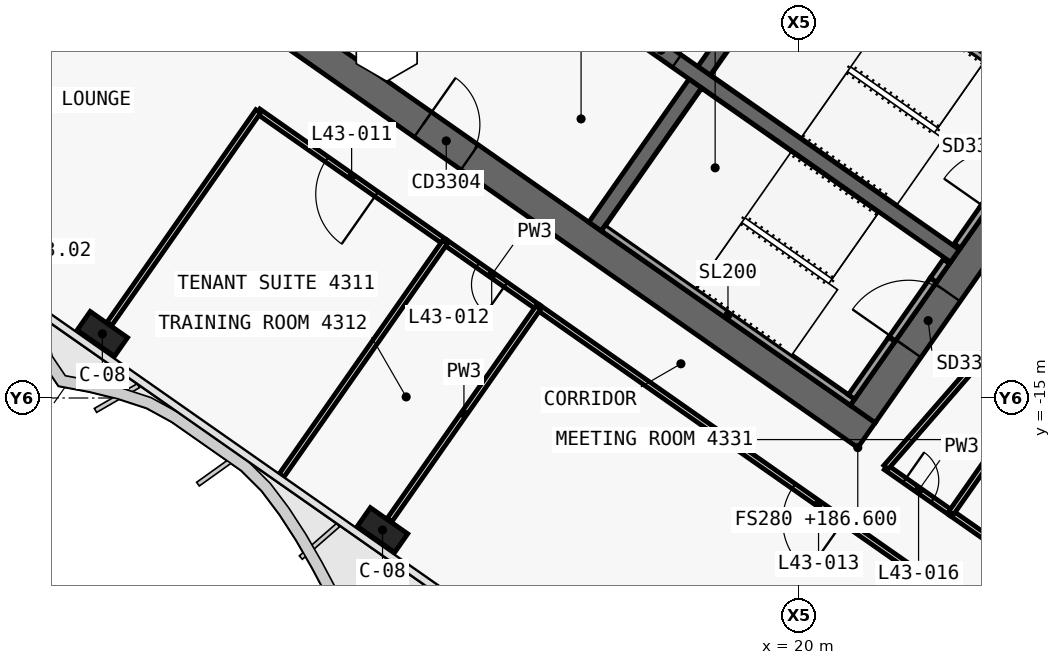
"""IFC4 building model, lengths in metres.
Left out: names, types, materials, properties, quantities, classifications, styles, units other than length and angle.
Written with IfcOpenShell. Run it as: python <this file> out.ifc"""

import sys

from ifc_helpers import new_model, si_unit, direction, frame, frame_2d, origin, origin_2d, place, context, subcontext, project, spatial, polyline, rectangle, outline, extrude, element, fill, save


model = new_model("IFC4")
c1 = context("Model", 3, precision=1e-05, world=origin(), true_north=direction((0.0, 1.0)))
c2 = subcontext(c1, "Body", "Model", "MODEL_VIEW")
j1 = project(units=[si_unit("LENGTHUNIT", "METRE"), si_unit("PLANEANGLEUNIT", "RADIAN")], contexts=[c1])
p1 = place(None, origin())
s1 = spatial("IfcSite", under=j1, at=p1, CompositionType="ELEMENT")
p2 = place(p1, origin())
s2 = spatial("IfcBuilding", under=s1, at=p2, CompositionType="ELEMENT")
p3 = place(p2, frame((0.0, 0.0, 186.6)))
s3 = spatial("IfcBuildingStorey", under=s2, at=p3, CompositionType="ELEMENT", Elevation=186.6)
p4 = place(p3, frame((-0.029, 11.984, 0.0), z_axis=(0.0, 0.0, 1.0), x_axis=(0.819151382952, -0.573577380837, 0.0)))
e1 = element("IfcWall", 1, at=p4, inside=s3, PredefinedType="SHEAR", context=c2, shape_type="SweptSolid", body=[
    extrude(outline(polyline([(33.898, 0.4), (-0.0, 0.4), (0.56, -0.4), (33.898, -0.4), (33.898, 0.4)])), origin(), (0.0, 0.0, 1.0), 3.9),
])
p5 = place(p3, frame((-0.029, -0.712, 0.0), z_axis=(0.0, 0.0, 1.0), x_axis=(0.819151758019, -0.573576845187, 0.0)))
e2 = element("IfcWall", 2, at=p5, inside=s3, PredefinedType="SHEAR", context=c2, shape_type="SweptSolid", body=[
    extrude(outline(polyline([(26.616, 0.4), (-0.0, 0.4), (0.56, -0.4), (26.616, -0.4), (26.616, 0.4)])), origin(), (0.0, 0.0, 1.0), 3.9),
])
p6 = place(p5, frame((1.166, 0.0, 0.0)))
e3 = element("IfcOpeningElement", 3, at=p6, cuts=e2, PredefinedType="OPENING", context=c2, shape_type="SweptSolid", body=[
    extrude(rectangle(XDim=1.5, YDim=2.1, at=frame_2d((0.75, 1.05))), frame((0.0, 0.41, 0.0), z_axis=(0.0, -1.0, 0.0), x_axis=(1.0, 0.0, 0.0)), (0.0, 0.0, 1.0), 0.82),
])
p7 = place(p5, frame((12.366, 0.0, 0.0)))
e4 = element("IfcOpeningElement", 4, at=p7, cuts=e2, PredefinedType="OPENING", context=c2, shape_type="SweptSolid", body=[
    extrude(rectangle(XDim=1.5, YDim=2.1, at=frame_2d((0.75, 1.05))), frame((0.0, 0.41, 0.0), z_axis=(0.0, -1.0, 0.0), x_axis=(1.0, 0.0, 0.0)), (0.0, 0.0, 1.0), 0.82),
])
p8 = place(p3, frame((21.675, -15.421, 0.0), z_axis=(0.0, 0.0, 1.0), x_axis=(0.573581815061, 0.819148278049, 0.0)))
e5 = element("IfcWall", 5, at=p8, inside=s3, PredefinedType="SHEAR", context=c2, shape_type="SweptSolid", body=[
    extrude(outline(polyline([(9.6, 0.4), (0.0, 0.4), (0.0, -0.4), (9.6, -0.4), (9.6, 0.4)])), origin(), (0.0, 0.0, 1.0), 3.9),
])
p9 = place(p8, frame((6.3, 0.0, 0.0)))
e6 = element("IfcOpeningElement", 6, at=p9, cuts=e5, PredefinedType="OPENING", context=c2, shape_type="SweptSolid", body=[
    extrude(rectangle(XDim=1.8, YDim=2.1, at=frame_2d((0.9, 1.05))), frame((0.0, 0.41, 0.0), z_axis=(0.0, -1.0, 0.0), x_axis=(1.0, 0.0, 0.0)), (0.0, 0.0, 1.0), 0.82),
])
p10 = place(p8, frame((2.1, 0.0, 0.0)))
e7 = element("IfcOpeningElement", 7, at=p10, cuts=e5, PredefinedType="OPENING", context=c2, shape_type="SweptSolid", body=[
    extrude(rectangle(XDim=1.8, YDim=2.1, at=frame_2d((0.9, 1.05))), frame((0.0, 0.41, 0.0), z_axis=(0.0, -1.0, 0.0), x_axis=(1.0, 0.0, 0.0)), (0.0, 0.0, 1.0), 0.82),
])
p11 = place(p3, frame((14.63, -10.488, 0.0), z_axis=(0.0, 0.0, 1.0), x_axis=(0.573611936273, 0.819127185829, 0.0)))
e8 = element("IfcWall", 8, at=p11, inside=s3, PredefinedType="SHEAR", context=c2, shape_type="SweptSolid", body=[
    extrude(outline(polyline([(0.0, 0.2), (0.0, -0.2), (4.6, -0.2), (4.6, 0.2), (0.0, 0.2)])), origin(), (0.0, 0.0, 1.0), 3.9),
])
p12 = place(p3, frame((17.498, -6.392, 0.0), z_axis=(0.0, 0.0, 1.0), x_axis=(0.573611936273, 0.819127185829, 0.0)))
e9 = element("IfcWall", 9, at=p12, inside=s3, PredefinedType="SHEAR", context=c2, shape_type="SweptSolid", body=[
    extrude(outline(polyline([(4.6, -0.2), (4.6, 0.2), (0.0, 0.2), (0.0, -0.2), (4.6, -0.2)])), origin(), (0.0, 0.0, 1.0), 3.9),
])
p13 = place(p3, frame((2.638, 3.768, 0.0), z_axis=(0.0, 0.0, 1.0), x_axis=(0.81915267502, -0.573575535572, 0.0)))
e10 = element("IfcWall", 10, at=p13, inside=s3, PredefinedType="SHEAR", context=c2, shape_type="SweptSolid", body=[
    extrude(outline(polyline([(0.0, 0.2), (0.0, -0.2), (26.2, -0.2), (26.2, 0.2), (0.0, 0.2)])), origin(), (0.0, 0.0, 1.0), 3.9),
])
p14 = place(p13, frame((9.637, 0.0, 0.0)))
e11 = element("IfcOpeningElement", 11, at=p14, cuts=e10, PredefinedType="OPENING", context=c2, shape_type="SweptSolid", body=[
    extrude(rectangle(XDim=1.2, YDim=2.1, at=frame_2d((0.6, 1.05))), frame((0.0, 0.21, 0.0), z_axis=(0.0, -1.0, 0.0), x_axis=(1.0, 0.0, 0.0)), (0.0, 0.0, 1.0), 0.42),
])
p15 = place(p13, frame((11.812, 0.0, 0.0)))
e12 = element("IfcOpeningElement", 12, at=p15, cuts=e10, PredefinedType="OPENING", context=c2, shape_type="SweptSolid", body=[
    extrude(rectangle(XDim=1.2, YDim=2.1, at=frame_2d((0.6, 1.05))), frame((0.0, 0.21, 0.0), z_axis=(0.0, -1.0, 0.0), x_axis=(1.0, 0.0, 0.0)), (0.0, 0.0, 1.0), 0.42),
])
p16 = place(p13, frame((13.988, 0.0, 0.0)))
e13 = element("IfcOpeningElement", 13, at=p16, cuts=e10, PredefinedType="OPENING", context=c2, shape_type="SweptSolid", body=[
    extrude(rectangle(XDim=1.2, YDim=2.1, at=frame_2d((0.6, 1.05))), frame((0.0, 0.21, 0.0), z_axis=(0.0, -1.0, 0.0), x_axis=(1.0, 0.0, 0.0)), (0.0, 0.0, 1.0), 0.42),
])
p17 = place(p13, frame((16.262, 0.0, 0.0)))
e14 = element("IfcOpeningElement", 14, at=p17, cuts=e10, PredefinedType="OPENING", context=c2, shape_type="SweptSolid", body=[
    extrude(rectangle(XDim=1.0, YDim=2.1, at=frame_2d((0.5, 1.05))), frame((0.0, 0.21, 0.0), z_axis=(0.0, -1.0, 0.0), x_axis=(1.0, 0.0, 0.0)), (0.0, 0.0, 1.0), 0.42),
])
for number, where, z_axis, x_axis in (
    (15, (1.665, -13.313, 0.0), (0.0, 0.0, 1.0), (0.819, -0.574, 0.0)),
    (16, (9.038, -18.475, 0.0), (0.0, 0.0, 1.0), (0.819, -0.574, 0.0)),
):
    element("IfcColumn", number, at=place(p3, frame(where, z_axis=z_axis, x_axis=x_axis)), inside=s3, PredefinedType="COLUMN", context=c2, shape_type="SweptSolid", body=[
        extrude(rectangle(XDim=1.2, YDim=0.6, at=origin_2d()), origin(), (0.0, 0.0, 1.0), 3.9),
    ])
p18 = place(p3, frame((20.243, -2.821, 0.0), z_axis=(0.0, 0.0, 1.0), x_axis=(0.819141584393, -0.57359137434, 0.0)))
e17 = element("IfcWall", 17, at=p18, inside=s3, PredefinedType="SOLIDWALL", context=c2, shape_type="SweptSolid", body=[
    extrude(rectangle(XDim=8.0, YDim=0.2, at=frame_2d((4.0, 0.0))), origin(), (0.0, 0.0, 1.0), 3.62),
])
p19 = place(p3, frame((24.162, -10.998, 0.0), z_axis=(0.0, 0.0, 1.0), x_axis=(0.573612502218, 0.819126789514, 0.0)))
e18 = element("IfcWall", 18, at=p19, inside=s3, PredefinedType="SOLIDWALL", context=c2, shape_type="SweptSolid", body=[
    extrude(rectangle(XDim=1.2, YDim=0.2, at=frame_2d((0.6, 0.0))), origin(), (0.0, 0.0, 1.0), 3.62),
])
p20 = place(p3, frame((24.85, -10.014, 2.15), z_axis=(0.0, 0.0, 1.0), x_axis=(0.573505465124, 0.819201734296, 0.0)))
e19 = element("IfcWall", 19, at=p20, inside=s3, PredefinedType="SOLIDWALL", context=c2, shape_type="SweptSolid", body=[
    extrude(rectangle(XDim=1.9, YDim=0.2, at=frame_2d((0.95, 0.0))), origin(), (0.0, 0.0, 1.0), 1.47),
])
p21 = place(p3, frame((14.851, -10.521, 0.0), z_axis=(0.0, 0.0, 1.0), x_axis=(0.819141584393, -0.57359137434, 0.0)))
e20 = element("IfcWall", 20, at=p21, inside=s3, PredefinedType="SOLIDWALL", context=c2, shape_type="SweptSolid", body=[
    extrude(rectangle(XDim=8.0, YDim=0.2, at=frame_2d((4.0, 0.0))), origin(), (0.0, 0.0, 1.0), 3.62),
])
p22 = place(p3, frame((21.38, -14.97, 0.0), z_axis=(0.0, 0.0, 1.0), x_axis=(0.573559770908, 0.819163713305, 0.0)))
e21 = element("IfcWall", 21, at=p22, inside=s3, PredefinedType="SOLIDWALL", context=c2, shape_type="SweptSolid", body=[
    extrude(rectangle(XDim=1.85, YDim=0.2, at=frame_2d((0.925, 0.0))), origin(), (0.0, 0.0, 1.0), 3.62),
])
p23 = place(p3, frame((23.531, -11.898, 0.0), z_axis=(0.0, 0.0, 1.0), x_axis=(0.573708088123, 0.819059844958, 0.0)))
e22 = element("IfcWall", 22, at=p23, inside=s3, PredefinedType="SOLIDWALL", context=c2, shape_type="SweptSolid", body=[
    extrude(rectangle(XDim=0.6, YDim=0.2, at=frame_2d((0.3, 0.0))), origin(), (0.0, 0.0, 1.0), 3.62),
])
p24 = place(p3, frame((22.441, -13.455, 2.15), z_axis=(0.0, 0.0, 1.0), x_axis=(0.573591692345, 0.819141361715, 0.0)))
e23 = element("IfcWall", 23, at=p24, inside=s3, PredefinedType="SOLIDWALL", context=c2, shape_type="SweptSolid", body=[
    extrude(rectangle(XDim=1.9, YDim=0.2, at=frame_2d((0.95, 0.0))), origin(), (0.0, 0.0, 1.0), 1.47),
])
p25 = place(p3, frame((22.283, -16.824, 0.0), z_axis=(0.0, 0.0, 1.0), x_axis=(0.819182738768, -0.573532597595, 0.0)))
e24 = element("IfcWall", 24, at=p25, inside=s3, PredefinedType="PARTITIONING", context=c2, shape_type="SweptSolid", body=[
    extrude(rectangle(XDim=2.099, YDim=0.15, at=frame_2d((1.05, 0.0))), origin(), (0.0, 0.0, 1.0), 3.62),
])
p26 = place(p25, frame((0.6, 0.0, 0.0)))
e25 = element("IfcOpeningElement", 25, at=p26, cuts=e24, PredefinedType="OPENING", context=c2, shape_type="SweptSolid", body=[
    extrude(rectangle(XDim=0.9, YDim=2.1, at=frame_2d((0.45, 1.05))), frame((0.0, 0.085, 0.0), z_axis=(0.0, -1.0, 0.0), x_axis=(1.0, 0.0, 0.0)), (0.0, 0.0, 1.0), 0.17),
])
p27 = place(p3, frame((23.999, -18.025, 0.0), z_axis=(0.0, 0.0, 1.0), x_axis=(0.819165703328, -0.573556928727, 0.0)))
e26 = element("IfcWall", 26, at=p27, inside=s3, PredefinedType="PARTITIONING", context=c2, shape_type="SweptSolid", body=[
    extrude(rectangle(XDim=4.504, YDim=0.15, at=frame_2d((2.252, 0.0))), origin(), (0.0, 0.0, 1.0), 3.62),
])
p28 = place(p27, frame((1.452, 0.0, 0.0)))
e27 = element("IfcOpeningElement", 27, at=p28, cuts=e26, PredefinedType="OPENING", context=c2, shape_type="SweptSolid", body=[
    extrude(rectangle(XDim=1.6, YDim=2.1, at=frame_2d((0.8, 1.05))), frame((0.0, 0.085, 0.0), z_axis=(0.0, -1.0, 0.0), x_axis=(1.0, 0.0, 0.0)), (0.0, 0.0, 1.0), 0.17),
])
p29 = place(p3, frame((10.683, -10.898, 0.0), z_axis=(0.0, 0.0, 1.0), x_axis=(-0.819147828287, 0.573582457378, 0.0)))
e28 = element("IfcWall", 28, at=p29, inside=s3, PredefinedType="PARTITIONING", context=c2, shape_type="SweptSolid", body=[
    extrude(rectangle(XDim=6.002, YDim=0.15, at=frame_2d((3.001, 0.0))), origin(), (0.0, 0.0, 1.0), 3.0),
])
p30 = place(p29, frame((2.201, 0.0, 0.0)))
e29 = element("IfcOpeningElement", 29, at=p30, cuts=e28, PredefinedType="OPENING", context=c2, shape_type="SweptSolid", body=[
    extrude(rectangle(XDim=1.6, YDim=2.1, at=frame_2d((0.8, 1.05))), frame((0.0, 0.085, 0.0), z_axis=(0.0, -1.0, 0.0), x_axis=(1.0, 0.0, 0.0)), (0.0, 0.0, 1.0), 0.17),
])
p31 = place(p3, frame((13.14, -12.619, 0.0), z_axis=(0.0, 0.0, 1.0), x_axis=(-0.819128818764, 0.573609604409, 0.0)))
e30 = element("IfcWall", 30, at=p31, inside=s3, PredefinedType="PARTITIONING", context=c2, shape_type="SweptSolid", body=[
    extrude(rectangle(XDim=3.004, YDim=0.15, at=frame_2d((1.502, 0.0))), origin(), (0.0, 0.0, 1.0), 3.0),
])
p32 = place(p31, frame((1.052, 0.0, 0.0)))
e31 = element("IfcOpeningElement", 31, at=p32, cuts=e30, PredefinedType="OPENING", context=c2, shape_type="SweptSolid", body=[
    extrude(rectangle(XDim=0.9, YDim=2.1, at=frame_2d((0.45, 1.05))), frame((0.0, 0.085, 0.0), z_axis=(0.0, -1.0, 0.0), x_axis=(1.0, 0.0, 0.0)), (0.0, 0.0, 1.0), 0.17),
])
p33 = place(p3, frame((27.885, -22.944, 0.0), z_axis=(0.0, 0.0, 1.0), x_axis=(-0.81914845568, 0.573581561381, 0.0)))
e32 = element("IfcWall", 32, at=p33, inside=s3, PredefinedType="PARTITIONING", context=c2, shape_type="SweptSolid", body=[
    extrude(rectangle(XDim=18.004, YDim=0.15, at=frame_2d((9.002, 0.0))), origin(), (0.0, 0.0, 1.0), 3.0),
])
p34 = place(p33, frame((8.202, 0.0, 0.0)))
e33 = element("IfcOpeningElement", 33, at=p34, cuts=e32, PredefinedType="OPENING", context=c2, shape_type="SweptSolid", body=[
    extrude(rectangle(XDim=1.6, YDim=2.1, at=frame_2d((0.8, 1.05))), frame((0.0, 0.085, 0.0), z_axis=(0.0, -1.0, 0.0), x_axis=(1.0, 0.0, 0.0)), (0.0, 0.0, 1.0), 0.17),
])
p35 = place(p3, frame((28.876, -11.064, 0.0), z_axis=(0.0, 0.0, 1.0), x_axis=(-0.573591492816, -0.819141501433, 0.0)))
e34 = element("IfcWall", 34, at=p35, inside=s3, PredefinedType="PARTITIONING", context=c2, shape_type="SweptSolid", body=[
    extrude(rectangle(XDim=8.5, YDim=0.15, at=frame_2d((4.25, 0.0))), origin(), (0.0, 0.0, 1.0), 3.0),
])
p36 = place(p3, frame((22.285, -16.825, 0.0), z_axis=(0.0, 0.0, 1.0), x_axis=(0.656781429942, 0.754080999153, 0.0)))
e35 = element("IfcWall", 35, at=p36, inside=s3, PredefinedType="PARTITIONING", context=c2, shape_type="SweptSolid", body=[
    extrude(rectangle(XDim=6.536, YDim=0.15, at=frame_2d((3.268, 0.0))), origin(), (0.0, 0.0, 1.0), 3.62),
])
p37 = place(p3, frame((10.681, -10.897, 0.0), z_axis=(0.0, 0.0, 1.0), x_axis=(-0.57358249317, -0.819147803225, 0.0)))
e36 = element("IfcWall", 36, at=p37, inside=s3, PredefinedType="PARTITIONING", context=c2, shape_type="SweptSolid", body=[
    extrude(rectangle(XDim=7.5, YDim=0.15, at=frame_2d((3.75, 0.0))), origin(), (0.0, 0.0, 1.0), 2.9),
])
p38 = place(p3, frame((1.849, -13.051, 0.0), z_axis=(0.0, 0.0, 1.0), x_axis=(0.573577493031, 0.819151304393, 0.0)))
e37 = element("IfcWall", 37, at=p38, inside=s3, PredefinedType="PARTITIONING", context=c2, shape_type="SweptSolid", body=[
    extrude(rectangle(XDim=6.83, YDim=0.15, at=frame_2d((3.415, 0.0))), origin(), (0.0, 0.0, 1.0), 3.0),
])
p39 = place(p3, frame((13.139, -12.618, 0.0), z_axis=(0.0, 0.0, 1.0), x_axis=(-0.573560698343, -0.819163063936, 0.0)))
e38 = element("IfcWall", 38, at=p39, inside=s3, PredefinedType="PARTITIONING", context=c2, shape_type="SweptSolid", body=[
    extrude(rectangle(XDim=6.83, YDim=0.15, at=frame_2d((3.415, 0.0))), origin(), (0.0, 0.0, 1.0), 3.0),
])
p40 = place(p17, origin())
e39 = element("IfcDoor", 39, at=p40, inside=s3, OperationType="SINGLE_SWING_RIGHT", PredefinedType="DOOR", context=c2, shape_type="SweptSolid", body=[
    extrude(rectangle(XDim=1.0, YDim=2.1, at=frame_2d((0.5, 1.05))), frame((0.0, 0.025, 0.0), z_axis=(0.0, -1.0, 0.0), x_axis=(1.0, 0.0, 0.0)), (0.0, 0.0, 1.0), 0.05),
])
fill(e14, e39)
p41 = place(p7, origin())
e40 = element("IfcDoor", 40, at=p41, inside=s3, OperationType="DOUBLE_DOOR_SINGLE_SWING", PredefinedType="DOOR", context=c2, shape_type="SweptSolid", body=[
    extrude(rectangle(XDim=1.5, YDim=2.1, at=frame_2d((0.75, 1.05))), frame((0.0, 0.025, 0.0), z_axis=(0.0, -1.0, 0.0), x_axis=(1.0, 0.0, 0.0)), (0.0, 0.0, 1.0), 0.05),
])
fill(e4, e40)
p42 = place(p10, origin())
e41 = element("IfcDoor", 41, at=p42, inside=s3, OperationType="DOUBLE_DOOR_SINGLE_SWING", PredefinedType="DOOR", context=c2, shape_type="SweptSolid", body=[
    extrude(rectangle(XDim=1.8, YDim=2.1, at=frame_2d((0.9, 1.05))), frame((0.0, 0.025, 0.0), z_axis=(0.0, -1.0, 0.0), x_axis=(1.0, 0.0, 0.0)), (0.0, 0.0, 1.0), 0.05),
])
fill(e7, e41)
p43 = place(p30, origin())
e42 = element("IfcDoor", 42, at=p43, inside=s3, OperationType="DOUBLE_DOOR_SINGLE_SWING", PredefinedType="DOOR", context=c2, shape_type="SweptSolid", body=[
    extrude(rectangle(XDim=1.6, YDim=2.1, at=frame_2d((0.8, 1.05))), frame((0.0, 0.025, 0.0), z_axis=(0.0, -1.0, 0.0), x_axis=(1.0, 0.0, 0.0)), (0.0, 0.0, 1.0), 0.05),
])
fill(e29, e42)
p44 = place(p32, origin())
e43 = element("IfcDoor", 43, at=p44, inside=s3, OperationType="SINGLE_SWING_LEFT", PredefinedType="DOOR", context=c2, shape_type="SweptSolid", body=[
    extrude(rectangle(XDim=0.9, YDim=2.1, at=frame_2d((0.45, 1.05))), frame((0.0, 0.025, 0.0), z_axis=(0.0, -1.0, 0.0), x_axis=(1.0, 0.0, 0.0)), (0.0, 0.0, 1.0), 0.05),
])
fill(e31, e43)
p45 = place(p34, origin())
e44 = element("IfcDoor", 44, at=p45, inside=s3, OperationType="DOUBLE_DOOR_SINGLE_SWING", PredefinedType="DOOR", context=c2, shape_type="SweptSolid", body=[
    extrude(rectangle(XDim=1.6, YDim=2.1, at=frame_2d((0.8, 1.05))), frame((0.0, 0.025, 0.0), z_axis=(0.0, -1.0, 0.0), x_axis=(1.0, 0.0, 0.0)), (0.0, 0.0, 1.0), 0.05),
])
fill(e33, e44)
p46 = place(p26, origin())
e45 = element("IfcDoor", 45, at=p46, inside=s3, OperationType="SINGLE_SWING_RIGHT", PredefinedType="DOOR", context=c2, shape_type="SweptSolid", body=[
    extrude(rectangle(XDim=0.9, YDim=2.1, at=frame_2d((0.45, 1.05))), frame((0.0, 0.025, 0.0), z_axis=(0.0, -1.0, 0.0), x_axis=(1.0, 0.0, 0.0)), (0.0, 0.0, 1.0), 0.05),
])
fill(e25, e45)
save(model, sys.argv[1])
